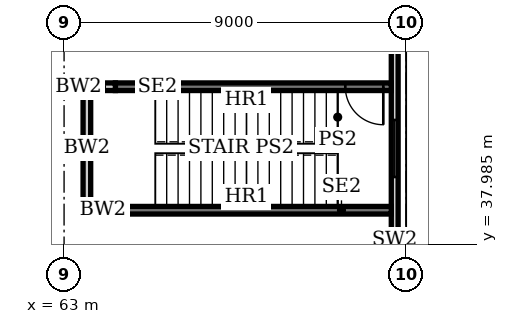
"""IFC4 building model, lengths in metres.
Left out: names, types, materials, properties, quantities, classifications, styles, units other than length and angle.
Written with IfcOpenShell. Run it as: python <this file> out.ifc"""

import sys

from ifc_helpers import new_model, si_unit, direction, frame, frame_2d, origin, place, context, subcontext, project, spatial, rectangle, extrude, element, fill, save


model = new_model("IFC4")
c1 = context("Model", 3, precision=1e-05, world=origin(), true_north=direction((0.0, 1.0)))
c2 = subcontext(c1, "Body", "Model", "MODEL_VIEW")
j1 = project(units=[si_unit("LENGTHUNIT", "METRE"), si_unit("PLANEANGLEUNIT", "RADIAN")], contexts=[c1])
p1 = place(None, origin())
s1 = spatial("IfcSite", under=j1, at=p1, CompositionType="ELEMENT")
p2 = place(p1, origin())
s2 = spatial("IfcBuilding", under=s1, at=p2, CompositionType="ELEMENT")
p3 = place(p2, frame((0.0, 0.0, 10.8)))
s3 = spatial("IfcBuildingStorey", under=s2, at=p3, CompositionType="ELEMENT", Elevation=10.8)
p4 = place(p3, frame((71.7, 36.4, 0.0), z_axis=(0.0, 0.0, 1.0), x_axis=(0.0, 1.0, 0.0)))
e1 = element("IfcWall", 1, at=p4, inside=s3, PredefinedType="SOLIDWALL", context=c2, shape_type="SweptSolid", body=[
    extrude(rectangle(XDim=8.2, YDim=0.18, at=frame_2d((4.1, 0.0))), origin(), (0.0, 0.0, 1.0), 3.8),
])
p5 = place(p4, frame((3.35, 0.0, 0.3)))
e2 = element("IfcOpeningElement", 2, at=p5, cuts=e1, PredefinedType="OPENING", context=c2, shape_type="SweptSolid", body=[
    extrude(rectangle(XDim=1.5, YDim=2.4, at=frame_2d((0.75, 1.2))), frame((0.0, 0.1, 0.0), z_axis=(0.0, -1.0, 0.0), x_axis=(1.0, 0.0, 0.0)), (0.0, 0.0, 1.0), 0.2),
])
p6 = place(p3, frame((71.61, 42.125, 0.0), z_axis=(0.0, 0.0, 1.0), x_axis=(-1.0, 0.0, 0.0)))
e3 = element("IfcWall", 3, at=p6, inside=s3, PredefinedType="SOLIDWALL", context=c2, shape_type="SweptSolid", body=[
    extrude(rectangle(XDim=7.26, YDim=0.2, at=frame_2d((3.63, 0.0))), origin(), (0.0, 0.0, 1.0), 5.0),
])
p7 = place(p6, frame((0.21, 0.0, 0.0)))
e4 = element("IfcOpeningElement", 4, at=p7, cuts=e3, PredefinedType="OPENING", context=c2, shape_type="SweptSolid", body=[
    extrude(rectangle(XDim=1.0, YDim=2.4, at=frame_2d((0.5, 1.2))), frame((0.0, 0.11, 0.0), z_axis=(0.0, -1.0, 0.0), x_axis=(1.0, 0.0, 0.0)), (0.0, 0.0, 1.0), 0.22),
])
p8 = place(p3, frame((71.61, 38.875, 0.0), z_axis=(0.0, 0.0, 1.0), x_axis=(-1.0, 0.0, 0.0)))
e5 = element("IfcWall", 5, at=p8, inside=s3, PredefinedType="SOLIDWALL", context=c2, shape_type="SweptSolid", body=[
    extrude(rectangle(XDim=7.26, YDim=0.2, at=frame_2d((3.63, 0.0))), origin(), (0.0, 0.0, 1.0), 5.0),
])
for number, where, z_axis, x_axis in (
    (6, (64.35, 42.125, 0.0), (0.0, 0.0, 1.0), (-1.0, 0.0, 0.0)),
    (7, (64.35, 38.875, 0.0), (0.0, 0.0, 1.0), (-1.0, 0.0, 0.0)),
):
    element("IfcWall", number, at=place(p3, frame(where, z_axis=z_axis, x_axis=x_axis)), inside=s3, PredefinedType="SOLIDWALL", context=c2, shape_type="SweptSolid", body=[
        extrude(rectangle(XDim=0.65, YDim=0.2, at=frame_2d((0.325, 0.0))), origin(), (0.0, 0.0, 1.0), 5.0),
    ])
p9 = place(p3, frame((63.6, 42.225, 0.0), z_axis=(0.0, 0.0, 1.0), x_axis=(0.0, -1.0, 0.0)))
e8 = element("IfcWall", 8, at=p9, inside=s3, PredefinedType="SOLIDWALL", context=c2, shape_type="SweptSolid", body=[
    extrude(rectangle(XDim=3.45, YDim=0.2, at=frame_2d((1.725, 0.0))), origin(), (0.0, 0.0, 1.0), 3.8),
])
p10 = place(p5, origin())
e9 = element("IfcWindow", 9, at=p10, inside=s3, PartitioningType="SINGLE_PANEL", PredefinedType="WINDOW", context=c2, shape_type="SweptSolid", body=[
    extrude(rectangle(XDim=1.5, YDim=2.4, at=frame_2d((0.75, 1.2))), frame((0.0, 0.03, 0.0), z_axis=(0.0, -1.0, 0.0), x_axis=(1.0, 0.0, 0.0)), (0.0, 0.0, 1.0), 0.06),
])
fill(e2, e9)
p11 = place(p7, origin())
e10 = element("IfcDoor", 10, at=p11, inside=s3, OperationType="SINGLE_SWING_RIGHT", PredefinedType="DOOR", context=c2, shape_type="SweptSolid", body=[
    extrude(rectangle(XDim=1.0, YDim=2.4, at=frame_2d((0.5, 1.2))), frame((0.0, 0.03, 0.0), z_axis=(0.0, -1.0, 0.0), x_axis=(1.0, 0.0, 0.0)), (0.0, 0.0, 1.0), 0.06),
])
fill(e4, e10)
save(model, sys.argv[1])
